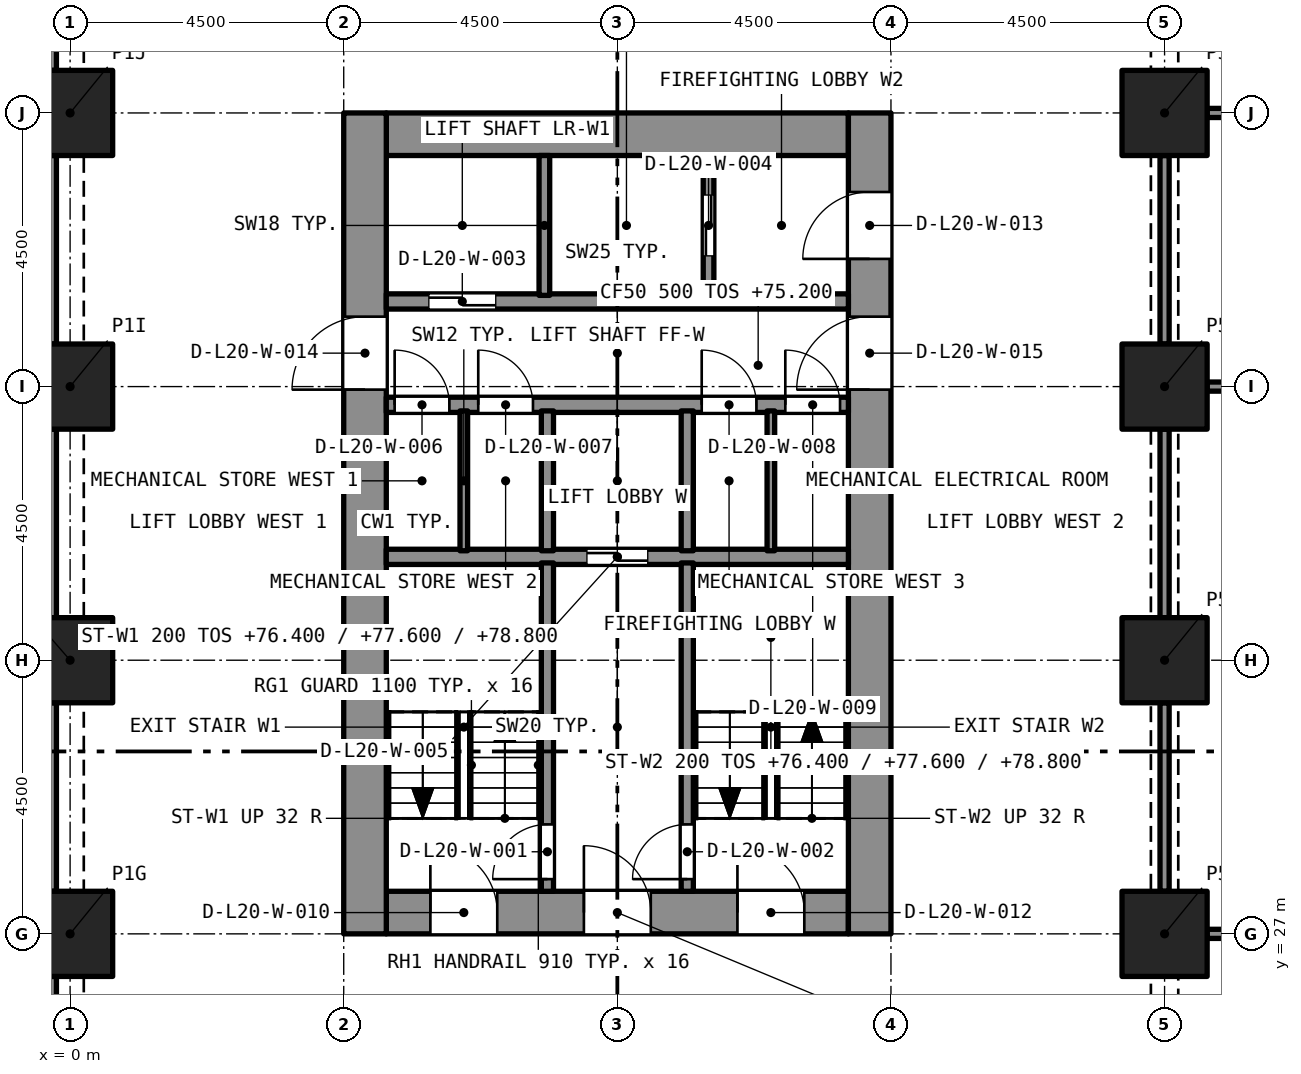
"""IFC4 building model, lengths in metres.
Left out: names, types, materials, properties, quantities, classifications, styles, units other than length and angle.
Written with IfcOpenShell. Run it as: python <this file> out.ifc"""

import sys

from ifc_helpers import new_model, si_unit, direction, frame, frame_2d, origin, origin_2d, place, context, subcontext, project, spatial, rectangle, extrude, element, fill, save


model = new_model("IFC4")
c1 = context("Model", 3, precision=1e-05, world=origin(), true_north=direction((0.0, 1.0)))
c2 = subcontext(c1, "Body", "Model", "MODEL_VIEW")
j1 = project(units=[si_unit("LENGTHUNIT", "METRE"), si_unit("PLANEANGLEUNIT", "RADIAN")], contexts=[c1])
p1 = place(None, origin())
s1 = spatial("IfcSite", under=j1, at=p1, CompositionType="ELEMENT")
p2 = place(p1, origin())
s2 = spatial("IfcBuilding", under=s1, at=p2, CompositionType="ELEMENT")
p3 = place(p2, frame((0.0, 0.0, 75.2)))
s3 = spatial("IfcBuildingStorey", under=s2, at=p3, CompositionType="ELEMENT", Elevation=75.2)
for number, where, z_axis, x_axis in (
    (1, (0.0, 27.0, 0.0), (0.0, 0.0, 1.0), (1.0, 0.0, 0.0)),
    (2, (18.0, 27.0, 0.0), (0.0, 0.0, 1.0), (1.0, 0.0, 0.0)),
    (3, (0.0, 31.5, 0.0), (0.0, 0.0, 1.0), (1.0, 0.0, 0.0)),
    (4, (18.0, 31.5, 0.0), (0.0, 0.0, 1.0), (1.0, 0.0, 0.0)),
    (5, (0.0, 36.0, 0.0), (0.0, 0.0, 1.0), (1.0, 0.0, 0.0)),
    (6, (18.0, 36.0, 0.0), (0.0, 0.0, 1.0), (1.0, 0.0, 0.0)),
    (7, (0.0, 40.5, 0.0), (0.0, 0.0, 1.0), (1.0, 0.0, 0.0)),
    (8, (18.0, 40.5, 0.0), (0.0, 0.0, 1.0), (1.0, 0.0, 0.0)),
):
    element("IfcColumn", number, at=place(p3, frame(where, z_axis=z_axis, x_axis=x_axis)), inside=s3, PredefinedType="COLUMN", context=c2, shape_type="SweptSolid", body=[
        extrude(rectangle(XDim=1.4, YDim=1.4, at=origin_2d()), origin(), (0.0, 0.0, 1.0), 4.8),
    ])
p4 = place(p3, frame((5.2, 27.35, 0.0), z_axis=(0.0, 0.0, 1.0), x_axis=(1.0, 0.0, 0.0)))
e9 = element("IfcWall", 9, at=p4, inside=s3, PredefinedType="SOLIDWALL", context=c2, shape_type="SweptSolid", body=[
    extrude(rectangle(XDim=7.6, YDim=0.7, at=frame_2d((3.8, 0.0))), origin(), (0.0, 0.0, 1.0), 4.8),
])
p5 = place(p4, frame((0.725, 0.0, 0.0)))
e10 = element("IfcOpeningElement", 10, at=p5, cuts=e9, PredefinedType="OPENING", context=c2, shape_type="SweptSolid", body=[
    extrude(rectangle(XDim=1.1, YDim=2.1, at=frame_2d((0.55, 1.05))), frame((0.0, 0.36, 0.0), z_axis=(0.0, -1.0, 0.0), x_axis=(1.0, 0.0, 0.0)), (0.0, 0.0, 1.0), 0.72),
])
p6 = place(p4, frame((3.25, 0.0, 0.0)))
e11 = element("IfcOpeningElement", 11, at=p6, cuts=e9, PredefinedType="OPENING", context=c2, shape_type="SweptSolid", body=[
    extrude(rectangle(XDim=1.1, YDim=2.1, at=frame_2d((0.55, 1.05))), frame((0.0, 0.36, 0.0), z_axis=(0.0, -1.0, 0.0), x_axis=(1.0, 0.0, 0.0)), (0.0, 0.0, 1.0), 0.72),
])
p7 = place(p4, frame((5.775, 0.0, 0.0)))
e12 = element("IfcOpeningElement", 12, at=p7, cuts=e9, PredefinedType="OPENING", context=c2, shape_type="SweptSolid", body=[
    extrude(rectangle(XDim=1.1, YDim=2.1, at=frame_2d((0.55, 1.05))), frame((0.0, 0.36, 0.0), z_axis=(0.0, -1.0, 0.0), x_axis=(1.0, 0.0, 0.0)), (0.0, 0.0, 1.0), 0.72),
])
p8 = place(p3, frame((5.2, 40.15, 0.0), z_axis=(0.0, 0.0, 1.0), x_axis=(1.0, 0.0, 0.0)))
e13 = element("IfcWall", 13, at=p8, inside=s3, PredefinedType="SOLIDWALL", context=c2, shape_type="SweptSolid", body=[
    extrude(rectangle(XDim=7.6, YDim=0.7, at=frame_2d((3.8, 0.0))), origin(), (0.0, 0.0, 1.0), 4.8),
])
p9 = place(p3, frame((4.85, 27.0, 0.0), z_axis=(0.0, 0.0, 1.0), x_axis=(0.0, 1.0, 0.0)))
e14 = element("IfcWall", 14, at=p9, inside=s3, PredefinedType="SOLIDWALL", context=c2, shape_type="SweptSolid", body=[
    extrude(rectangle(XDim=13.5, YDim=0.7, at=frame_2d((6.75, 0.0))), origin(), (0.0, 0.0, 1.0), 4.8),
])
p10 = place(p9, frame((8.95, 0.0, 0.0)))
e15 = element("IfcOpeningElement", 15, at=p10, cuts=e14, PredefinedType="OPENING", context=c2, shape_type="SweptSolid", body=[
    extrude(rectangle(XDim=1.2, YDim=2.1, at=frame_2d((0.6, 1.05))), frame((0.0, 0.36, 0.0), z_axis=(0.0, -1.0, 0.0), x_axis=(1.0, 0.0, 0.0)), (0.0, 0.0, 1.0), 0.72),
])
p11 = place(p3, frame((13.15, 27.0, 0.0), z_axis=(0.0, 0.0, 1.0), x_axis=(0.0, 1.0, 0.0)))
e16 = element("IfcWall", 16, at=p11, inside=s3, PredefinedType="SOLIDWALL", context=c2, shape_type="SweptSolid", body=[
    extrude(rectangle(XDim=13.5, YDim=0.7, at=frame_2d((6.75, 0.0))), origin(), (0.0, 0.0, 1.0), 4.8),
])
p12 = place(p11, frame((11.1, 0.0, 0.0)))
e17 = element("IfcOpeningElement", 17, at=p12, cuts=e16, PredefinedType="OPENING", context=c2, shape_type="SweptSolid", body=[
    extrude(rectangle(XDim=1.1, YDim=2.1, at=frame_2d((0.55, 1.05))), frame((0.0, 0.36, 0.0), z_axis=(0.0, -1.0, 0.0), x_axis=(1.0, 0.0, 0.0)), (0.0, 0.0, 1.0), 0.72),
])
p13 = place(p11, frame((8.95, 0.0, 0.0)))
e18 = element("IfcOpeningElement", 18, at=p13, cuts=e16, PredefinedType="OPENING", context=c2, shape_type="SweptSolid", body=[
    extrude(rectangle(XDim=1.2, YDim=2.1, at=frame_2d((0.6, 1.05))), frame((0.0, 0.36, 0.0), z_axis=(0.0, -1.0, 0.0), x_axis=(1.0, 0.0, 0.0)), (0.0, 0.0, 1.0), 0.72),
])
for number, where, z_axis, x_axis in (
    (19, (-0.375, 41.2, 0.0), (0.0, 0.0, 1.0), (0.0, 1.0, 0.0)),
    (20, (-0.375, 36.7, 0.0), (0.0, 0.0, 1.0), (0.0, 1.0, 0.0)),
    (21, (-0.375, 32.2, 0.0), (0.0, 0.0, 1.0), (0.0, 1.0, 0.0)),
    (22, (-0.375, 27.7, 0.0), (0.0, 0.0, 1.0), (0.0, 1.0, 0.0)),
    (23, (-0.375, 23.2, 0.0), (0.0, 0.0, 1.0), (0.0, 1.0, 0.0)),
):
    element("IfcWall", number, at=place(p3, frame(where, z_axis=z_axis, x_axis=x_axis)), inside=s3, PredefinedType="SOLIDWALL", context=c2, shape_type="SweptSolid", body=[
        extrude(rectangle(XDim=3.1, YDim=0.3, at=frame_2d((1.55, 0.0))), origin(), (0.0, 0.0, 1.0), 4.8),
    ])
p14 = place(p3, frame((5.2, 33.2, 0.0), z_axis=(0.0, 0.0, 1.0), x_axis=(1.0, 0.0, 0.0)))
e24 = element("IfcWall", 24, at=p14, inside=s3, PredefinedType="SOLIDWALL", context=c2, shape_type="SweptSolid", body=[
    extrude(rectangle(XDim=7.6, YDim=0.25, at=frame_2d((3.8, 0.0))), origin(), (0.0, 0.0, 1.0), 4.5),
])
p15 = place(p14, frame((3.3, 0.0, 0.0)))
e25 = element("IfcOpeningElement", 25, at=p15, cuts=e24, PredefinedType="OPENING", context=c2, shape_type="SweptSolid", body=[
    extrude(rectangle(XDim=1.0, YDim=2.1, at=frame_2d((0.5, 1.05))), frame((0.0, 0.135, 0.0), z_axis=(0.0, -1.0, 0.0), x_axis=(1.0, 0.0, 0.0)), (0.0, 0.0, 1.0), 0.27),
])
p16 = place(p3, frame((5.2, 35.7, 0.0), z_axis=(0.0, 0.0, 1.0), x_axis=(1.0, 0.0, 0.0)))
e26 = element("IfcWall", 26, at=p16, inside=s3, PredefinedType="SOLIDWALL", context=c2, shape_type="SweptSolid", body=[
    extrude(rectangle(XDim=7.6, YDim=0.25, at=frame_2d((3.8, 0.0))), origin(), (0.0, 0.0, 1.0), 4.5),
])
p17 = place(p16, frame((0.137, 0.0, 0.0)))
e27 = element("IfcOpeningElement", 27, at=p17, cuts=e26, PredefinedType="OPENING", context=c2, shape_type="SweptSolid", body=[
    extrude(rectangle(XDim=0.9, YDim=2.1, at=frame_2d((0.45, 1.05))), frame((0.0, 0.135, 0.0), z_axis=(0.0, -1.0, 0.0), x_axis=(1.0, 0.0, 0.0)), (0.0, 0.0, 1.0), 0.27),
])
p18 = place(p16, frame((1.512, 0.0, 0.0)))
e28 = element("IfcOpeningElement", 28, at=p18, cuts=e26, PredefinedType="OPENING", context=c2, shape_type="SweptSolid", body=[
    extrude(rectangle(XDim=0.9, YDim=2.1, at=frame_2d((0.45, 1.05))), frame((0.0, 0.135, 0.0), z_axis=(0.0, -1.0, 0.0), x_axis=(1.0, 0.0, 0.0)), (0.0, 0.0, 1.0), 0.27),
])
p19 = place(p16, frame((5.188, 0.0, 0.0)))
e29 = element("IfcOpeningElement", 29, at=p19, cuts=e26, PredefinedType="OPENING", context=c2, shape_type="SweptSolid", body=[
    extrude(rectangle(XDim=0.9, YDim=2.1, at=frame_2d((0.45, 1.05))), frame((0.0, 0.135, 0.0), z_axis=(0.0, -1.0, 0.0), x_axis=(1.0, 0.0, 0.0)), (0.0, 0.0, 1.0), 0.27),
])
p20 = place(p16, frame((6.562, 0.0, 0.0)))
e30 = element("IfcOpeningElement", 30, at=p20, cuts=e26, PredefinedType="OPENING", context=c2, shape_type="SweptSolid", body=[
    extrude(rectangle(XDim=0.9, YDim=2.1, at=frame_2d((0.45, 1.05))), frame((0.0, 0.135, 0.0), z_axis=(0.0, -1.0, 0.0), x_axis=(1.0, 0.0, 0.0)), (0.0, 0.0, 1.0), 0.27),
])
p21 = place(p3, frame((5.2, 37.4, 0.0), z_axis=(0.0, 0.0, 1.0), x_axis=(1.0, 0.0, 0.0)))
e31 = element("IfcWall", 31, at=p21, inside=s3, PredefinedType="SOLIDWALL", context=c2, shape_type="SweptSolid", body=[
    extrude(rectangle(XDim=7.6, YDim=0.25, at=frame_2d((3.8, 0.0))), origin(), (0.0, 0.0, 1.0), 4.5),
])
p22 = place(p21, frame((0.7, 0.0, 0.0)))
e32 = element("IfcOpeningElement", 32, at=p22, cuts=e31, PredefinedType="OPENING", context=c2, shape_type="SweptSolid", body=[
    extrude(rectangle(XDim=1.1, YDim=2.4, at=frame_2d((0.55, 1.2))), frame((0.0, 0.135, 0.0), z_axis=(0.0, -1.0, 0.0), x_axis=(1.0, 0.0, 0.0)), (0.0, 0.0, 1.0), 0.27),
])
p23 = place(p3, frame((7.85, 27.7, 0.0), z_axis=(0.0, 0.0, 1.0), x_axis=(0.0, 1.0, 0.0)))
e33 = element("IfcWall", 33, at=p23, inside=s3, PredefinedType="SOLIDWALL", context=c2, shape_type="SweptSolid", body=[
    extrude(rectangle(XDim=5.4, YDim=0.2, at=frame_2d((2.7, 0.0))), origin(), (0.0, 0.0, 1.0), 4.5),
])
p24 = place(p23, frame((0.2, 0.0, 0.0)))
e34 = element("IfcOpeningElement", 34, at=p24, cuts=e33, PredefinedType="OPENING", context=c2, shape_type="SweptSolid", body=[
    extrude(rectangle(XDim=0.9, YDim=2.1, at=frame_2d((0.45, 1.05))), frame((0.0, 0.11, 0.0), z_axis=(0.0, -1.0, 0.0), x_axis=(1.0, 0.0, 0.0)), (0.0, 0.0, 1.0), 0.22),
])
p25 = place(p3, frame((10.15, 27.7, 0.0), z_axis=(0.0, 0.0, 1.0), x_axis=(0.0, 1.0, 0.0)))
e35 = element("IfcWall", 35, at=p25, inside=s3, PredefinedType="SOLIDWALL", context=c2, shape_type="SweptSolid", body=[
    extrude(rectangle(XDim=5.4, YDim=0.2, at=frame_2d((2.7, 0.0))), origin(), (0.0, 0.0, 1.0), 4.5),
])
p26 = place(p25, frame((0.2, 0.0, 0.0)))
e36 = element("IfcOpeningElement", 36, at=p26, cuts=e35, PredefinedType="OPENING", context=c2, shape_type="SweptSolid", body=[
    extrude(rectangle(XDim=0.9, YDim=2.1, at=frame_2d((0.45, 1.05))), frame((0.0, 0.11, 0.0), z_axis=(0.0, -1.0, 0.0), x_axis=(1.0, 0.0, 0.0)), (0.0, 0.0, 1.0), 0.22),
])
for number, where, z_axis, x_axis in (
    (37, (7.85, 33.3, 0.0), (0.0, 0.0, 1.0), (0.0, 1.0, 0.0)),
    (38, (10.15, 33.3, 0.0), (0.0, 0.0, 1.0), (0.0, 1.0, 0.0)),
):
    element("IfcWall", number, at=place(p3, frame(where, z_axis=z_axis, x_axis=x_axis)), inside=s3, PredefinedType="SOLIDWALL", context=c2, shape_type="SweptSolid", body=[
        extrude(rectangle(XDim=2.3, YDim=0.2, at=frame_2d((1.15, 0.0))), origin(), (0.0, 0.0, 1.0), 4.5),
    ])
p27 = place(p3, frame((7.8, 37.5, 0.0), z_axis=(0.0, 0.0, 1.0), x_axis=(0.0, 1.0, 0.0)))
e39 = element("IfcWall", 39, at=p27, inside=s3, PredefinedType="SOLIDWALL", context=c2, shape_type="SweptSolid", body=[
    extrude(rectangle(XDim=2.3, YDim=0.175, at=frame_2d((1.15, 0.0))), origin(), (0.0, 0.0, 1.0), 4.5),
])
p28 = place(p3, frame((10.5, 37.5, 0.0), z_axis=(0.0, 0.0, 1.0), x_axis=(0.0, 1.0, 0.0)))
e40 = element("IfcWall", 40, at=p28, inside=s3, PredefinedType="SOLIDWALL", context=c2, shape_type="SweptSolid", body=[
    extrude(rectangle(XDim=2.3, YDim=0.175, at=frame_2d((1.15, 0.0))), origin(), (0.0, 0.0, 1.0), 4.5),
])
p29 = place(p28, frame((0.65, 0.0, 0.0)))
e41 = element("IfcOpeningElement", 41, at=p29, cuts=e40, PredefinedType="OPENING", context=c2, shape_type="SweptSolid", body=[
    extrude(rectangle(XDim=1.0, YDim=2.1, at=frame_2d((0.5, 1.05))), frame((0.0, 0.097, 0.0), z_axis=(0.0, -1.0, 0.0), x_axis=(1.0, 0.0, 0.0)), (0.0, 0.0, 1.0), 0.195),
])
for number, where, z_axis, x_axis in (
    (42, (6.475, 33.3, 0.0), (0.0, 0.0, 1.0), (0.0, 1.0, 0.0)),
    (43, (11.525, 33.3, 0.0), (0.0, 0.0, 1.0), (0.0, 1.0, 0.0)),
):
    element("IfcWall", number, at=place(p3, frame(where, z_axis=z_axis, x_axis=x_axis)), inside=s3, PredefinedType="PARTITIONING", context=c2, shape_type="SweptSolid", body=[
        extrude(rectangle(XDim=2.3, YDim=0.125, at=frame_2d((1.15, 0.0))), origin(), (0.0, 0.0, 1.0), 4.5),
    ])
p30 = place(p3, frame((18.7, 27.0, 0.0), z_axis=(0.0, 0.0, 1.0), x_axis=(1.0, 0.0, 0.0)))
e44 = element("IfcWall", 44, at=p30, inside=s3, PredefinedType="PARTITIONING", context=c2, shape_type="SweptSolid", body=[
    extrude(rectangle(XDim=12.1, YDim=0.15, at=frame_2d((6.05, 0.0))), origin(), (0.0, 0.0, 1.0), 4.35),
])
p31 = place(p30, frame((5.3, 0.0, 0.0)))
e45 = element("IfcOpeningElement", 45, at=p31, cuts=e44, PredefinedType="OPENING", context=c2, shape_type="SweptSolid", body=[
    extrude(rectangle(XDim=1.5, YDim=2.4, at=frame_2d((0.75, 1.2))), frame((0.0, 0.085, 0.0), z_axis=(0.0, -1.0, 0.0), x_axis=(1.0, 0.0, 0.0)), (0.0, 0.0, 1.0), 0.17),
])
p32 = place(p3, frame((18.7, 36.0, 0.0), z_axis=(0.0, 0.0, 1.0), x_axis=(1.0, 0.0, 0.0)))
e46 = element("IfcWall", 46, at=p32, inside=s3, PredefinedType="PARTITIONING", context=c2, shape_type="SweptSolid", body=[
    extrude(rectangle(XDim=12.1, YDim=0.15, at=frame_2d((6.05, 0.0))), origin(), (0.0, 0.0, 1.0), 4.35),
])
for number, where, z_axis, x_axis in (
    (47, (18.0, 27.7, 0.0), (0.0, 0.0, 1.0), (0.0, 1.0, 0.0)),
    (48, (18.0, 32.2, 0.0), (0.0, 0.0, 1.0), (0.0, 1.0, 0.0)),
):
    element("IfcWall", number, at=place(p3, frame(where, z_axis=z_axis, x_axis=x_axis)), inside=s3, PredefinedType="PARTITIONING", context=c2, shape_type="SweptSolid", body=[
        extrude(rectangle(XDim=3.1, YDim=0.15, at=frame_2d((1.55, 0.0))), origin(), (0.0, 0.0, 1.0), 3.98),
    ])
p33 = place(p3, frame((30.8, 40.5, 0.0), z_axis=(0.0, 0.0, 1.0), x_axis=(-1.0, 0.0, 0.0)))
e49 = element("IfcWall", 49, at=p33, inside=s3, PredefinedType="PARTITIONING", context=c2, shape_type="SweptSolid", body=[
    extrude(rectangle(XDim=12.1, YDim=0.15, at=frame_2d((6.05, 0.0))), origin(), (0.0, 0.0, 1.0), 4.35),
])
p34 = place(p33, frame((5.55, 0.0, 0.0)))
e50 = element("IfcOpeningElement", 50, at=p34, cuts=e49, PredefinedType="OPENING", context=c2, shape_type="SweptSolid", body=[
    extrude(rectangle(XDim=1.0, YDim=2.1, at=frame_2d((0.5, 1.05))), frame((0.0, 0.085, 0.0), z_axis=(0.0, -1.0, 0.0), x_axis=(1.0, 0.0, 0.0)), (0.0, 0.0, 1.0), 0.17),
])
p35 = place(p3, frame((18.0, 36.7, 0.0), z_axis=(0.0, 0.0, 1.0), x_axis=(0.0, 1.0, 0.0)))
e51 = element("IfcWall", 51, at=p35, inside=s3, PredefinedType="PARTITIONING", context=c2, shape_type="SweptSolid", body=[
    extrude(rectangle(XDim=3.1, YDim=0.15, at=frame_2d((1.55, 0.0))), origin(), (0.0, 0.0, 1.0), 3.98),
])
p36 = place(p24, origin())
e52 = element("IfcDoor", 52, at=p36, inside=s3, OperationType="SINGLE_SWING_LEFT", PredefinedType="DOOR", context=c2, shape_type="SweptSolid", body=[
    extrude(rectangle(XDim=0.9, YDim=2.1, at=frame_2d((0.45, 1.05))), frame((0.0, 0.025, 0.0), z_axis=(0.0, -1.0, 0.0), x_axis=(1.0, 0.0, 0.0)), (0.0, 0.0, 1.0), 0.05),
])
fill(e34, e52)
p37 = place(p26, origin())
e53 = element("IfcDoor", 53, at=p37, inside=s3, OperationType="SINGLE_SWING_LEFT", PredefinedType="DOOR", context=c2, shape_type="SweptSolid", body=[
    extrude(rectangle(XDim=0.9, YDim=2.1, at=frame_2d((0.45, 1.05))), frame((0.0, 0.025, 0.0), z_axis=(0.0, -1.0, 0.0), x_axis=(1.0, 0.0, 0.0)), (0.0, 0.0, 1.0), 0.05),
])
fill(e36, e53)
p38 = place(p22, origin())
e54 = element("IfcDoor", 54, at=p38, inside=s3, OperationType="SLIDING_TO_LEFT", PredefinedType="DOOR", context=c2, shape_type="SweptSolid", body=[
    extrude(rectangle(XDim=1.1, YDim=2.4, at=frame_2d((0.55, 1.2))), frame((0.0, 0.025, 0.0), z_axis=(0.0, -1.0, 0.0), x_axis=(1.0, 0.0, 0.0)), (0.0, 0.0, 1.0), 0.05),
])
fill(e32, e54)
p39 = place(p29, origin())
e55 = element("IfcDoor", 55, at=p39, inside=s3, OperationType="SLIDING_TO_LEFT", PredefinedType="DOOR", context=c2, shape_type="SweptSolid", body=[
    extrude(rectangle(XDim=1.0, YDim=2.1, at=frame_2d((0.5, 1.05))), frame((0.0, 0.025, 0.0), z_axis=(0.0, -1.0, 0.0), x_axis=(1.0, 0.0, 0.0)), (0.0, 0.0, 1.0), 0.05),
])
fill(e41, e55)
p40 = place(p15, origin())
e56 = element("IfcDoor", 56, at=p40, inside=s3, OperationType="SLIDING_TO_LEFT", PredefinedType="DOOR", context=c2, shape_type="SweptSolid", body=[
    extrude(rectangle(XDim=1.0, YDim=2.1, at=frame_2d((0.5, 1.05))), frame((0.0, 0.025, 0.0), z_axis=(0.0, -1.0, 0.0), x_axis=(1.0, 0.0, 0.0)), (0.0, 0.0, 1.0), 0.05),
])
fill(e25, e56)
p41 = place(p17, origin())
e57 = element("IfcDoor", 57, at=p41, inside=s3, OperationType="SINGLE_SWING_LEFT", PredefinedType="DOOR", context=c2, shape_type="SweptSolid", body=[
    extrude(rectangle(XDim=0.9, YDim=2.1, at=frame_2d((0.45, 1.05))), frame((0.0, 0.025, 0.0), z_axis=(0.0, -1.0, 0.0), x_axis=(1.0, 0.0, 0.0)), (0.0, 0.0, 1.0), 0.05),
])
fill(e27, e57)
p42 = place(p18, origin())
e58 = element("IfcDoor", 58, at=p42, inside=s3, OperationType="SINGLE_SWING_LEFT", PredefinedType="DOOR", context=c2, shape_type="SweptSolid", body=[
    extrude(rectangle(XDim=0.9, YDim=2.1, at=frame_2d((0.45, 1.05))), frame((0.0, 0.025, 0.0), z_axis=(0.0, -1.0, 0.0), x_axis=(1.0, 0.0, 0.0)), (0.0, 0.0, 1.0), 0.05),
])
fill(e28, e58)
p43 = place(p19, origin())
e59 = element("IfcDoor", 59, at=p43, inside=s3, OperationType="SINGLE_SWING_LEFT", PredefinedType="DOOR", context=c2, shape_type="SweptSolid", body=[
    extrude(rectangle(XDim=0.9, YDim=2.1, at=frame_2d((0.45, 1.05))), frame((0.0, 0.025, 0.0), z_axis=(0.0, -1.0, 0.0), x_axis=(1.0, 0.0, 0.0)), (0.0, 0.0, 1.0), 0.05),
])
fill(e29, e59)
p44 = place(p20, origin())
e60 = element("IfcDoor", 60, at=p44, inside=s3, OperationType="SINGLE_SWING_LEFT", PredefinedType="DOOR", context=c2, shape_type="SweptSolid", body=[
    extrude(rectangle(XDim=0.9, YDim=2.1, at=frame_2d((0.45, 1.05))), frame((0.0, 0.025, 0.0), z_axis=(0.0, -1.0, 0.0), x_axis=(1.0, 0.0, 0.0)), (0.0, 0.0, 1.0), 0.05),
])
fill(e30, e60)
p45 = place(p5, origin())
e61 = element("IfcDoor", 61, at=p45, inside=s3, OperationType="SINGLE_SWING_LEFT", PredefinedType="DOOR", context=c2, shape_type="SweptSolid", body=[
    extrude(rectangle(XDim=1.1, YDim=2.1, at=frame_2d((0.55, 1.05))), frame((0.0, 0.025, 0.0), z_axis=(0.0, -1.0, 0.0), x_axis=(1.0, 0.0, 0.0)), (0.0, 0.0, 1.0), 0.05),
])
fill(e10, e61)
p46 = place(p6, origin())
e62 = element("IfcDoor", 62, at=p46, inside=s3, OperationType="SINGLE_SWING_LEFT", PredefinedType="DOOR", context=c2, shape_type="SweptSolid", body=[
    extrude(rectangle(XDim=1.1, YDim=2.1, at=frame_2d((0.55, 1.05))), frame((0.0, 0.025, 0.0), z_axis=(0.0, -1.0, 0.0), x_axis=(1.0, 0.0, 0.0)), (0.0, 0.0, 1.0), 0.05),
])
fill(e11, e62)
p47 = place(p7, origin())
e63 = element("IfcDoor", 63, at=p47, inside=s3, OperationType="SINGLE_SWING_LEFT", PredefinedType="DOOR", context=c2, shape_type="SweptSolid", body=[
    extrude(rectangle(XDim=1.1, YDim=2.1, at=frame_2d((0.55, 1.05))), frame((0.0, 0.025, 0.0), z_axis=(0.0, -1.0, 0.0), x_axis=(1.0, 0.0, 0.0)), (0.0, 0.0, 1.0), 0.05),
])
fill(e12, e63)
p48 = place(p12, origin())
e64 = element("IfcDoor", 64, at=p48, inside=s3, OperationType="SINGLE_SWING_LEFT", PredefinedType="DOOR", context=c2, shape_type="SweptSolid", body=[
    extrude(rectangle(XDim=1.1, YDim=2.1, at=frame_2d((0.55, 1.05))), frame((0.0, 0.025, 0.0), z_axis=(0.0, -1.0, 0.0), x_axis=(1.0, 0.0, 0.0)), (0.0, 0.0, 1.0), 0.05),
])
fill(e17, e64)
p49 = place(p10, origin())
e65 = element("IfcDoor", 65, at=p49, inside=s3, OperationType="SINGLE_SWING_LEFT", PredefinedType="DOOR", context=c2, shape_type="SweptSolid", body=[
    extrude(rectangle(XDim=1.2, YDim=2.1, at=frame_2d((0.6, 1.05))), frame((0.0, 0.025, 0.0), z_axis=(0.0, -1.0, 0.0), x_axis=(1.0, 0.0, 0.0)), (0.0, 0.0, 1.0), 0.05),
])
fill(e15, e65)
p50 = place(p13, origin())
e66 = element("IfcDoor", 66, at=p50, inside=s3, OperationType="SINGLE_SWING_LEFT", PredefinedType="DOOR", context=c2, shape_type="SweptSolid", body=[
    extrude(rectangle(XDim=1.2, YDim=2.1, at=frame_2d((0.6, 1.05))), frame((0.0, 0.025, 0.0), z_axis=(0.0, -1.0, 0.0), x_axis=(1.0, 0.0, 0.0)), (0.0, 0.0, 1.0), 0.05),
])
fill(e18, e66)
save(model, sys.argv[1])
